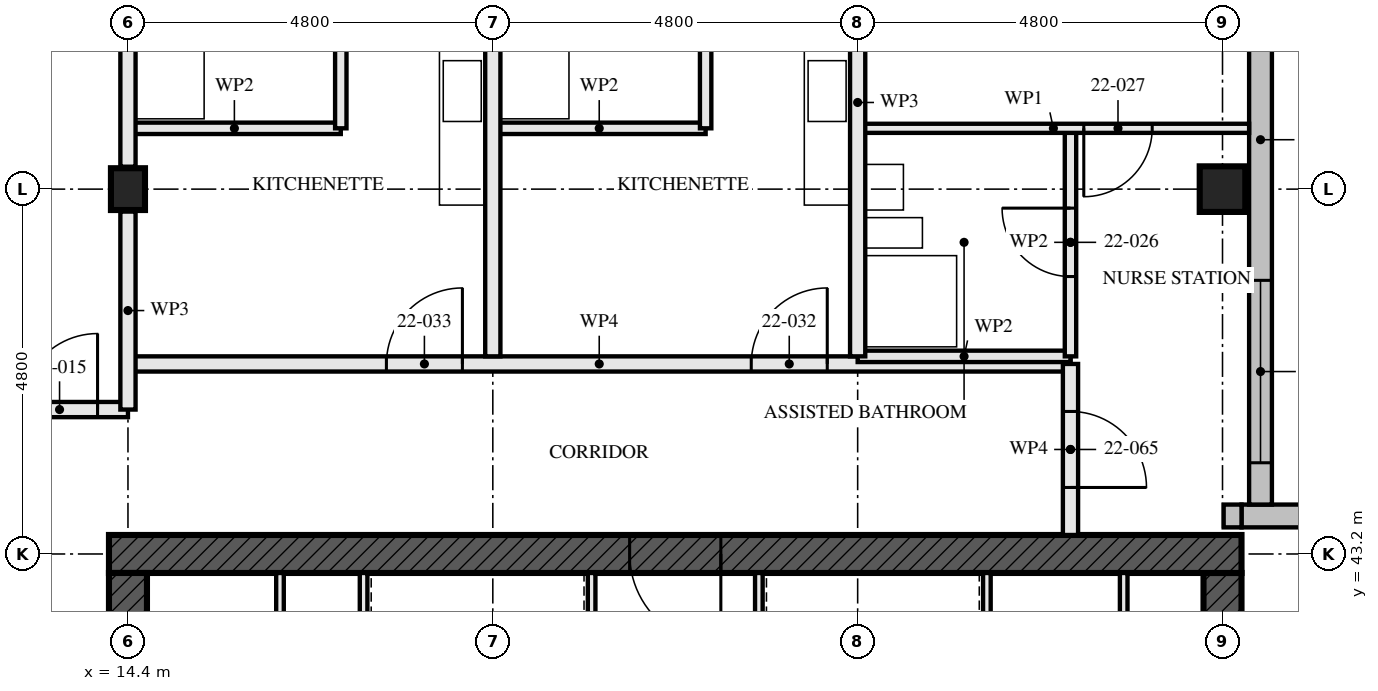
"""IFC4 building model, lengths in metres.
Left out: names, types, materials, properties, quantities, classifications, styles, units other than length and angle.
Written with IfcOpenShell. Run it as: python <this file> out.ifc"""

import sys

from ifc_helpers import new_model, si_unit, direction, frame, frame_2d, origin, origin_2d, place, context, subcontext, project, spatial, rectangle, hollow_rectangle, i_section, extrude, element, fill, save


model = new_model("IFC4")
c1 = context("Model", 3, precision=1e-05, world=origin(), true_north=direction((0.0, 1.0)))
c2 = subcontext(c1, "Body", "Model", "MODEL_VIEW")
j1 = project(units=[si_unit("LENGTHUNIT", "METRE"), si_unit("PLANEANGLEUNIT", "RADIAN")], contexts=[c1])
p1 = place(None, origin())
s1 = spatial("IfcSite", under=j1, at=p1, CompositionType="ELEMENT")
p2 = place(p1, origin())
s2 = spatial("IfcBuilding", under=s1, at=p2, CompositionType="ELEMENT")
p3 = place(p2, frame((0.0, 0.0, 84.0)))
s3 = spatial("IfcBuildingStorey", under=s2, at=p3, CompositionType="ELEMENT", Elevation=84.0)
p4 = place(p3, frame((14.4, 48.0, 0.0), z_axis=(0.0, 0.0, 1.0), x_axis=(1.0, 0.0, 0.0)))
e1 = element("IfcColumn", 1, at=p4, inside=s3, PredefinedType="COLUMN", context=c2, shape_type="SweptSolid", body=[
    extrude(i_section(OverallWidth=0.448, OverallDepth=0.55, WebThickness=0.072, FlangeThickness=0.115, FilletRadius=0.015, at=origin_2d()), origin(), (0.0, 0.0, 1.0), 3.5),
])
p5 = place(p3, frame((28.8, 48.0, 0.0), z_axis=(0.0, 0.0, 1.0), x_axis=(1.0, 0.0, 0.0)))
e2 = element("IfcColumn", 2, at=p5, inside=s3, PredefinedType="COLUMN", context=c2, shape_type="SweptSolid", body=[
    extrude(hollow_rectangle(XDim=0.6, YDim=0.6, WallThickness=0.08, at=origin_2d()), origin(), (0.0, 0.0, 1.0), 3.5),
])
p6 = place(p3, frame((29.05, 43.2, -0.17), z_axis=(0.0, 0.0, 1.0), x_axis=(-1.0, 0.0, 0.0)))
e3 = element("IfcWall", 3, at=p6, inside=s3, PredefinedType="SHEAR", context=c2, shape_type="SweptSolid", body=[
    extrude(rectangle(XDim=14.9, YDim=0.5, at=frame_2d((7.45, 0.0))), origin(), (0.0, 0.0, 1.0), 3.5),
])
p7 = place(p6, frame((6.85, 0.0, 0.17)))
e4 = element("IfcOpeningElement", 4, at=p7, cuts=e3, PredefinedType="OPENING", context=c2, shape_type="SweptSolid", body=[
    extrude(rectangle(XDim=1.2, YDim=2.1, at=frame_2d((0.6, 1.05))), frame((0.0, 0.26, 0.0), z_axis=(0.0, -1.0, 0.0), x_axis=(1.0, 0.0, 0.0)), (0.0, 0.0, 1.0), 0.521),
])
p8 = place(p3, frame((14.4, 42.95, -0.17), z_axis=(0.0, 0.0, 1.0), x_axis=(0.0, -1.0, 0.0)))
e5 = element("IfcWall", 5, at=p8, inside=s3, PredefinedType="SHEAR", context=c2, shape_type="SweptSolid", body=[
    extrude(rectangle(XDim=13.9, YDim=0.5, at=frame_2d((6.95, 0.0))), origin(), (0.0, 0.0, 1.0), 3.5),
])
p9 = place(p8, frame((6.35, 0.0, 0.17)))
e6 = element("IfcOpeningElement", 6, at=p9, cuts=e5, PredefinedType="OPENING", context=c2, shape_type="SweptSolid", body=[
    extrude(rectangle(XDim=1.2, YDim=2.1, at=frame_2d((0.6, 1.05))), frame((0.0, 0.26, 0.0), z_axis=(0.0, -1.0, 0.0), x_axis=(1.0, 0.0, 0.0)), (0.0, 0.0, 1.0), 0.521),
])
p10 = place(p3, frame((28.8, 29.05, -0.17), z_axis=(0.0, 0.0, 1.0), x_axis=(0.0, 1.0, 0.0)))
e7 = element("IfcWall", 7, at=p10, inside=s3, PredefinedType="SHEAR", context=c2, shape_type="SweptSolid", body=[
    extrude(rectangle(XDim=13.9, YDim=0.5, at=frame_2d((6.95, 0.0))), origin(), (0.0, 0.0, 1.0), 3.5),
])
p11 = place(p10, frame((6.35, 0.0, 0.17)))
e8 = element("IfcOpeningElement", 8, at=p11, cuts=e7, PredefinedType="OPENING", context=c2, shape_type="SweptSolid", body=[
    extrude(rectangle(XDim=1.2, YDim=2.1, at=frame_2d((0.6, 1.05))), frame((0.0, 0.26, 0.0), z_axis=(0.0, -1.0, 0.0), x_axis=(1.0, 0.0, 0.0)), (0.0, 0.0, 1.0), 0.521),
])
p12 = place(p3, frame((38.75, 43.7, 0.0), z_axis=(0.0, 0.0, 1.0), x_axis=(-1.0, 0.0, 0.0)))
e9 = element("IfcWall", 9, at=p12, inside=s3, PredefinedType="SOLIDWALL", context=c2, shape_type="SweptSolid", body=[
    extrude(rectangle(XDim=9.7, YDim=0.3, at=frame_2d((4.85, 0.0))), origin(), (0.0, 0.0, 1.0), 3.5),
])
p13 = place(p12, frame((2.25, 0.0, 0.0)))
e10 = element("IfcOpeningElement", 10, at=p13, cuts=e9, PredefinedType="OPENING", context=c2, shape_type="SweptSolid", body=[
    extrude(rectangle(XDim=1.0, YDim=2.4, at=frame_2d((0.5, 1.2))), frame((0.0, 0.161, 0.0), z_axis=(0.0, -1.0, 0.0), x_axis=(1.0, 0.0, 0.0)), (0.0, 0.0, 1.0), 0.321),
])
p14 = place(p12, frame((6.35, 0.0, 0.6)))
e11 = element("IfcOpeningElement", 11, at=p14, cuts=e9, PredefinedType="OPENING", context=c2, shape_type="SweptSolid", body=[
    extrude(rectangle(XDim=2.4, YDim=1.8, at=frame_2d((1.2, 0.9))), frame((0.0, 0.161, 0.0), z_axis=(0.0, -1.0, 0.0), x_axis=(1.0, 0.0, 0.0)), (0.0, 0.0, 1.0), 0.321),
])
p15 = place(p3, frame((29.3, 43.85, 0.0), z_axis=(0.0, 0.0, 1.0), x_axis=(0.0, 1.0, 0.0)))
e12 = element("IfcWall", 12, at=p15, inside=s3, PredefinedType="SOLIDWALL", context=c2, shape_type="SweptSolid", body=[
    extrude(rectangle(XDim=9.6, YDim=0.3, at=frame_2d((4.8, 0.0))), origin(), (0.0, 0.0, 1.0), 3.5),
])
p16 = place(p15, frame((6.05, 0.0, 0.0)))
e13 = element("IfcOpeningElement", 13, at=p16, cuts=e12, PredefinedType="OPENING", context=c2, shape_type="SweptSolid", body=[
    extrude(rectangle(XDim=1.0, YDim=2.4, at=frame_2d((0.5, 1.2))), frame((0.0, 0.161, 0.0), z_axis=(0.0, -1.0, 0.0), x_axis=(1.0, 0.0, 0.0)), (0.0, 0.0, 1.0), 0.321),
])
p17 = place(p15, frame((0.55, 0.0, 0.6)))
e14 = element("IfcOpeningElement", 14, at=p17, cuts=e12, PredefinedType="OPENING", context=c2, shape_type="SweptSolid", body=[
    extrude(rectangle(XDim=2.4, YDim=1.8, at=frame_2d((1.2, 0.9))), frame((0.0, 0.161, 0.0), z_axis=(0.0, -1.0, 0.0), x_axis=(1.0, 0.0, 0.0)), (0.0, 0.0, 1.0), 0.321),
])
p18 = place(p3, frame((29.05, 43.7, 2.39), z_axis=(0.0, 0.0, 1.0), x_axis=(-1.0, 0.0, 0.0)))
e15 = element("IfcWall", 15, at=p18, inside=s3, PredefinedType="SOLIDWALL", context=c2, shape_type="SweptSolid", body=[
    extrude(rectangle(XDim=0.235, YDim=0.3, at=frame_2d((0.118, 0.0))), origin(), (0.0, 0.0, 1.0), 0.88),
])
p19 = place(p3, frame((14.4, 45.1, 0.0), z_axis=(0.0, 0.0, 1.0), x_axis=(-1.0, 0.0, 0.0)))
e16 = element("IfcWall", 16, at=p19, inside=s3, PredefinedType="PARTITIONING", context=c2, shape_type="SweptSolid", body=[
    extrude(rectangle(XDim=9.6, YDim=0.2, at=frame_2d((4.8, 0.0))), origin(), (0.0, 0.0, 1.0), 3.33),
])
p20 = place(p19, frame((0.4, 0.0, 0.0)))
e17 = element("IfcOpeningElement", 17, at=p20, cuts=e16, PredefinedType="OPENING", context=c2, shape_type="SweptSolid", body=[
    extrude(rectangle(XDim=1.0, YDim=2.1, at=frame_2d((0.5, 1.05))), frame((0.0, 0.111, 0.0), z_axis=(0.0, -1.0, 0.0), x_axis=(1.0, 0.0, 0.0)), (0.0, 0.0, 1.0), 0.221),
])
p21 = place(p19, frame((5.2, 0.0, 0.0)))
e18 = element("IfcOpeningElement", 18, at=p21, cuts=e16, PredefinedType="OPENING", context=c2, shape_type="SweptSolid", body=[
    extrude(rectangle(XDim=1.0, YDim=2.1, at=frame_2d((0.5, 1.05))), frame((0.0, 0.111, 0.0), z_axis=(0.0, -1.0, 0.0), x_axis=(1.0, 0.0, 0.0)), (0.0, 0.0, 1.0), 0.221),
])
p22 = place(p3, frame((26.8, 48.8, 0.0), z_axis=(0.0, 0.0, 1.0), x_axis=(0.0, -1.0, 0.0)))
e19 = element("IfcWall", 19, at=p22, inside=s3, PredefinedType="PARTITIONING", context=c2, shape_type="SweptSolid", body=[
    extrude(rectangle(XDim=3.0, YDim=0.15, at=frame_2d((1.5, 0.0))), origin(), (0.0, 0.0, 1.0), 2.55),
])
p23 = place(p22, frame((1.05, 0.0, 0.0)))
e20 = element("IfcOpeningElement", 20, at=p23, cuts=e19, PredefinedType="OPENING", context=c2, shape_type="SweptSolid", body=[
    extrude(rectangle(XDim=0.9, YDim=2.1, at=frame_2d((0.45, 1.05))), frame((0.0, 0.085, 0.0), z_axis=(0.0, -1.0, 0.0), x_axis=(1.0, 0.0, 0.0)), (0.0, 0.0, 1.0), 0.171),
])
p24 = place(p3, frame((26.8, 45.8, 0.0), z_axis=(0.0, 0.0, 1.0), x_axis=(-1.0, 0.0, 0.0)))
e21 = element("IfcWall", 21, at=p24, inside=s3, PredefinedType="PARTITIONING", context=c2, shape_type="SweptSolid", body=[
    extrude(rectangle(XDim=2.8, YDim=0.15, at=frame_2d((1.4, 0.0))), origin(), (0.0, 0.0, 1.0), 3.33),
])
p25 = place(p3, frame((29.15, 48.8, 0.0), z_axis=(0.0, 0.0, 1.0), x_axis=(-1.0, 0.0, 0.0)))
e22 = element("IfcWall", 22, at=p25, inside=s3, PredefinedType="PARTITIONING", context=c2, shape_type="SweptSolid", body=[
    extrude(rectangle(XDim=5.15, YDim=0.12, at=frame_2d((2.575, 0.0))), origin(), (0.0, 0.0, 1.0), 2.32),
])
p26 = place(p25, frame((1.275, 0.0, 0.0)))
e23 = element("IfcOpeningElement", 23, at=p26, cuts=e22, PredefinedType="OPENING", context=c2, shape_type="SweptSolid", body=[
    extrude(rectangle(XDim=0.9, YDim=2.1, at=frame_2d((0.45, 1.05))), frame((0.0, 0.071, 0.0), z_axis=(0.0, -1.0, 0.0), x_axis=(1.0, 0.0, 0.0)), (0.0, 0.0, 1.0), 0.141),
])
p27 = place(p3, frame((24.0, 52.48, 0.0), z_axis=(0.0, 0.0, 1.0), x_axis=(0.0, -1.0, 0.0)))
e24 = element("IfcWall", 24, at=p27, inside=s3, PredefinedType="PARTITIONING", context=c2, shape_type="SweptSolid", body=[
    extrude(rectangle(XDim=6.68, YDim=0.2, at=frame_2d((3.34, 0.0))), origin(), (0.0, 0.0, 1.0), 2.55),
])
p28 = place(p3, frame((22.0, 51.8, 0.0), z_axis=(0.0, 0.0, 1.0), x_axis=(0.0, -1.0, 0.0)))
e25 = element("IfcWall", 25, at=p28, inside=s3, PredefinedType="PARTITIONING", context=c2, shape_type="SweptSolid", body=[
    extrude(rectangle(XDim=3.0, YDim=0.15, at=frame_2d((1.5, 0.0))), origin(), (0.0, 0.0, 1.0), 3.33),
])
p29 = place(p3, frame((22.0, 48.8, 0.0), z_axis=(0.0, 0.0, 1.0), x_axis=(-1.0, 0.0, 0.0)))
e26 = element("IfcWall", 26, at=p29, inside=s3, PredefinedType="PARTITIONING", context=c2, shape_type="SweptSolid", body=[
    extrude(rectangle(XDim=2.8, YDim=0.15, at=frame_2d((1.4, 0.0))), origin(), (0.0, 0.0, 1.0), 3.33),
])
p30 = place(p3, frame((19.2, 57.28, 0.0), z_axis=(0.0, 0.0, 1.0), x_axis=(0.0, -1.0, 0.0)))
e27 = element("IfcWall", 27, at=p30, inside=s3, PredefinedType="PARTITIONING", context=c2, shape_type="SweptSolid", body=[
    extrude(rectangle(XDim=11.48, YDim=0.2, at=frame_2d((5.74, 0.0))), origin(), (0.0, 0.0, 1.0), 2.55),
])
p31 = place(p3, frame((17.2, 51.8, 0.0), z_axis=(0.0, 0.0, 1.0), x_axis=(0.0, -1.0, 0.0)))
e28 = element("IfcWall", 28, at=p31, inside=s3, PredefinedType="PARTITIONING", context=c2, shape_type="SweptSolid", body=[
    extrude(rectangle(XDim=3.0, YDim=0.15, at=frame_2d((1.5, 0.0))), origin(), (0.0, 0.0, 1.0), 3.33),
])
p32 = place(p3, frame((17.2, 48.8, 0.0), z_axis=(0.0, 0.0, 1.0), x_axis=(-1.0, 0.0, 0.0)))
e29 = element("IfcWall", 29, at=p32, inside=s3, PredefinedType="PARTITIONING", context=c2, shape_type="SweptSolid", body=[
    extrude(rectangle(XDim=2.8, YDim=0.15, at=frame_2d((1.4, 0.0))), origin(), (0.0, 0.0, 1.0), 3.33),
])
p33 = place(p3, frame((26.8, 45.7, 0.0), z_axis=(0.0, 0.0, 1.0), x_axis=(-1.0, 0.0, 0.0)))
e30 = element("IfcWall", 30, at=p33, inside=s3, PredefinedType="PARTITIONING", context=c2, shape_type="SweptSolid", body=[
    extrude(rectangle(XDim=12.4, YDim=0.2, at=frame_2d((6.2, 0.0))), origin(), (0.0, 0.0, 1.0), 3.33),
])
p34 = place(p33, frame((3.2, 0.0, 0.0)))
e31 = element("IfcOpeningElement", 31, at=p34, cuts=e30, PredefinedType="OPENING", context=c2, shape_type="SweptSolid", body=[
    extrude(rectangle(XDim=1.0, YDim=2.1, at=frame_2d((0.5, 1.05))), frame((0.0, 0.111, 0.0), z_axis=(0.0, -1.0, 0.0), x_axis=(1.0, 0.0, 0.0)), (0.0, 0.0, 1.0), 0.221),
])
p35 = place(p33, frame((8.0, 0.0, 0.0)))
e32 = element("IfcOpeningElement", 32, at=p35, cuts=e30, PredefinedType="OPENING", context=c2, shape_type="SweptSolid", body=[
    extrude(rectangle(XDim=1.0, YDim=2.1, at=frame_2d((0.5, 1.05))), frame((0.0, 0.111, 0.0), z_axis=(0.0, -1.0, 0.0), x_axis=(1.0, 0.0, 0.0)), (0.0, 0.0, 1.0), 0.221),
])
for number, where, z_axis, x_axis in (
    (33, (16.4, 37.15, 0.0), (0.0, 0.0, 1.0), (0.0, 1.0, 0.0)),
    (34, (27.5, 37.15, 0.0), (0.0, 0.0, 1.0), (0.0, 1.0, 0.0)),
):
    element("IfcWall", number, at=place(p3, frame(where, z_axis=z_axis, x_axis=x_axis)), inside=s3, PredefinedType="SOLIDWALL", context=c2, shape_type="SweptSolid", body=[
        extrude(rectangle(XDim=5.8, YDim=0.1, at=frame_2d((2.9, 0.0))), origin(), (0.0, 0.0, 1.0), 3.33),
    ])
p36 = place(p3, frame((20.5, 37.15, 0.0), z_axis=(0.0, 0.0, 1.0), x_axis=(0.0, 1.0, 0.0)))
e35 = element("IfcWall", 35, at=p36, inside=s3, PredefinedType="SOLIDWALL", context=c2, shape_type="SweptSolid", body=[
    extrude(rectangle(XDim=5.8, YDim=0.1, at=frame_2d((2.9, 0.0))), origin(), (0.0, 0.0, 1.0), 3.33),
])
p37 = place(p36, frame((0.925, 0.0, 0.0)))
e36 = element("IfcOpeningElement", 36, at=p37, cuts=e35, PredefinedType="OPENING", context=c2, shape_type="SweptSolid", body=[
    extrude(rectangle(XDim=1.0, YDim=2.1, at=frame_2d((0.5, 1.05))), frame((0.0, 0.061, 0.0), z_axis=(0.0, -1.0, 0.0), x_axis=(1.0, 0.0, 0.0)), (0.0, 0.0, 1.0), 0.121),
])
p38 = place(p36, frame((3.9, 0.0, 0.0)))
e37 = element("IfcOpeningElement", 37, at=p38, cuts=e35, PredefinedType="OPENING", context=c2, shape_type="SweptSolid", body=[
    extrude(rectangle(XDim=1.0, YDim=2.1, at=frame_2d((0.5, 1.05))), frame((0.0, 0.061, 0.0), z_axis=(0.0, -1.0, 0.0), x_axis=(1.0, 0.0, 0.0)), (0.0, 0.0, 1.0), 0.121),
])
p39 = place(p3, frame((22.7, 37.15, 0.0), z_axis=(0.0, 0.0, 1.0), x_axis=(0.0, 1.0, 0.0)))
e38 = element("IfcWall", 38, at=p39, inside=s3, PredefinedType="SOLIDWALL", context=c2, shape_type="SweptSolid", body=[
    extrude(rectangle(XDim=5.8, YDim=0.1, at=frame_2d((2.9, 0.0))), origin(), (0.0, 0.0, 1.0), 3.33),
])
p40 = place(p39, frame((0.925, 0.0, 0.0)))
e39 = element("IfcOpeningElement", 39, at=p40, cuts=e38, PredefinedType="OPENING", context=c2, shape_type="SweptSolid", body=[
    extrude(rectangle(XDim=1.0, YDim=2.1, at=frame_2d((0.5, 1.05))), frame((0.0, 0.061, 0.0), z_axis=(0.0, -1.0, 0.0), x_axis=(1.0, 0.0, 0.0)), (0.0, 0.0, 1.0), 0.121),
])
p41 = place(p39, frame((3.9, 0.0, 0.0)))
e40 = element("IfcOpeningElement", 40, at=p41, cuts=e38, PredefinedType="OPENING", context=c2, shape_type="SweptSolid", body=[
    extrude(rectangle(XDim=1.0, YDim=2.1, at=frame_2d((0.5, 1.05))), frame((0.0, 0.061, 0.0), z_axis=(0.0, -1.0, 0.0), x_axis=(1.0, 0.0, 0.0)), (0.0, 0.0, 1.0), 0.121),
])
for number, where, z_axis, x_axis in (
    (41, (17.5, 37.15, 0.0), (0.0, 0.0, 1.0), (0.0, 1.0, 0.0)),
    (42, (25.7, 37.15, 0.0), (0.0, 0.0, 1.0), (0.0, 1.0, 0.0)),
):
    element("IfcWall", number, at=place(p3, frame(where, z_axis=z_axis, x_axis=x_axis)), inside=s3, PredefinedType="SOLIDWALL", context=c2, shape_type="SweptSolid", body=[
        extrude(rectangle(XDim=5.8, YDim=0.1, at=frame_2d((2.9, 0.0))), origin(), (0.0, 0.0, 1.0), 3.33),
    ])
p42 = place(p3, frame((14.4, 45.1, 0.0), z_axis=(0.0, 0.0, 1.0), x_axis=(0.0, 1.0, 0.0)))
e43 = element("IfcWall", 43, at=p42, inside=s3, PredefinedType="PARTITIONING", context=c2, shape_type="SweptSolid", body=[
    extrude(rectangle(XDim=2.605, YDim=0.2, at=frame_2d((1.302, 0.0))), origin(), (0.0, 0.0, 1.0), 2.32),
])
p43 = place(p3, frame((14.4, 48.295, 0.0), z_axis=(0.0, 0.0, 1.0), x_axis=(0.0, 1.0, 0.0)))
e44 = element("IfcWall", 44, at=p43, inside=s3, PredefinedType="PARTITIONING", context=c2, shape_type="SweptSolid", body=[
    extrude(rectangle(XDim=4.21, YDim=0.2, at=frame_2d((2.105, 0.0))), origin(), (0.0, 0.0, 1.0), 2.32),
])
p44 = place(p3, frame((26.8, 45.7, 0.0), z_axis=(0.0, 0.0, 1.0), x_axis=(0.0, -1.0, 0.0)))
e45 = element("IfcWall", 45, at=p44, inside=s3, PredefinedType="PARTITIONING", context=c2, shape_type="SweptSolid", body=[
    extrude(rectangle(XDim=2.25, YDim=0.2, at=frame_2d((1.125, 0.0))), origin(), (0.0, 0.0, 1.0), 3.33),
])
p45 = place(p44, frame((0.625, 0.0, 0.0)))
e46 = element("IfcOpeningElement", 46, at=p45, cuts=e45, PredefinedType="OPENING", context=c2, shape_type="SweptSolid", body=[
    extrude(rectangle(XDim=1.0, YDim=2.1, at=frame_2d((0.5, 1.05))), frame((0.0, 0.111, 0.0), z_axis=(0.0, -1.0, 0.0), x_axis=(1.0, 0.0, 0.0)), (0.0, 0.0, 1.0), 0.221),
])
p46 = place(p17, origin())
e47 = element("IfcWindow", 47, at=p46, inside=s3, PartitioningType="SINGLE_PANEL", PredefinedType="WINDOW", context=c2, shape_type="SweptSolid", body=[
    extrude(rectangle(XDim=2.4, YDim=1.8, at=frame_2d((1.2, 0.9))), frame((0.0, 0.03, 0.0), z_axis=(0.0, -1.0, 0.0), x_axis=(1.0, 0.0, 0.0)), (0.0, 0.0, 1.0), 0.06),
])
fill(e14, e47)
p47 = place(p20, frame((1.0, 0.0, 0.0), z_axis=(0.0, 0.0, 1.0), x_axis=(-1.0, 0.0, 0.0)))
e48 = element("IfcDoor", 48, at=p47, inside=s3, OperationType="SINGLE_SWING_LEFT", PredefinedType="DOOR", context=c2, shape_type="SweptSolid", body=[
    extrude(rectangle(XDim=1.0, YDim=2.1, at=frame_2d((0.5, 1.05))), frame((0.0, 0.027, 0.0), z_axis=(0.0, -1.0, 0.0), x_axis=(1.0, 0.0, 0.0)), (0.0, 0.0, 1.0), 0.054),
])
fill(e17, e48)
p48 = place(p23, frame((0.9, 0.0, 0.0), z_axis=(0.0, 0.0, 1.0), x_axis=(-1.0, 0.0, 0.0)))
e49 = element("IfcDoor", 49, at=p48, inside=s3, OperationType="SINGLE_SWING_LEFT", PredefinedType="DOOR", context=c2, shape_type="SweptSolid", body=[
    extrude(rectangle(XDim=0.9, YDim=2.1, at=frame_2d((0.45, 1.05))), frame((0.0, 0.022, 0.0), z_axis=(0.0, -1.0, 0.0), x_axis=(1.0, 0.0, 0.0)), (0.0, 0.0, 1.0), 0.044),
])
fill(e20, e49)
p49 = place(p26, origin())
e50 = element("IfcDoor", 50, at=p49, inside=s3, OperationType="SINGLE_SWING_LEFT", PredefinedType="DOOR", context=c2, shape_type="SweptSolid", body=[
    extrude(rectangle(XDim=0.9, YDim=2.1, at=frame_2d((0.45, 1.05))), frame((0.0, 0.022, 0.0), z_axis=(0.0, -1.0, 0.0), x_axis=(1.0, 0.0, 0.0)), (0.0, 0.0, 1.0), 0.044),
])
fill(e23, e50)
p50 = place(p34, frame((1.0, 0.0, 0.0), z_axis=(0.0, 0.0, 1.0), x_axis=(-1.0, 0.0, 0.0)))
e51 = element("IfcDoor", 51, at=p50, inside=s3, OperationType="SINGLE_SWING_LEFT", PredefinedType="DOOR", context=c2, shape_type="SweptSolid", body=[
    extrude(rectangle(XDim=1.0, YDim=2.1, at=frame_2d((0.5, 1.05))), frame((0.0, 0.027, 0.0), z_axis=(0.0, -1.0, 0.0), x_axis=(1.0, 0.0, 0.0)), (0.0, 0.0, 1.0), 0.054),
])
fill(e31, e51)
p51 = place(p35, frame((1.0, 0.0, 0.0), z_axis=(0.0, 0.0, 1.0), x_axis=(-1.0, 0.0, 0.0)))
e52 = element("IfcDoor", 52, at=p51, inside=s3, OperationType="SINGLE_SWING_LEFT", PredefinedType="DOOR", context=c2, shape_type="SweptSolid", body=[
    extrude(rectangle(XDim=1.0, YDim=2.1, at=frame_2d((0.5, 1.05))), frame((0.0, 0.027, 0.0), z_axis=(0.0, -1.0, 0.0), x_axis=(1.0, 0.0, 0.0)), (0.0, 0.0, 1.0), 0.054),
])
fill(e32, e52)
p52 = place(p45, origin())
e53 = element("IfcDoor", 53, at=p52, inside=s3, OperationType="SINGLE_SWING_LEFT", PredefinedType="DOOR", context=c2, shape_type="SweptSolid", body=[
    extrude(rectangle(XDim=1.0, YDim=2.1, at=frame_2d((0.5, 1.05))), frame((0.0, 0.027, 0.0), z_axis=(0.0, -1.0, 0.0), x_axis=(1.0, 0.0, 0.0)), (0.0, 0.0, 1.0), 0.054),
])
fill(e46, e53)
p53 = place(p7, origin())
e54 = element("IfcDoor", 54, at=p53, inside=s3, OperationType="SINGLE_SWING_LEFT", PredefinedType="DOOR", context=c2, shape_type="SweptSolid", body=[
    extrude(rectangle(XDim=1.2, YDim=2.1, at=frame_2d((0.6, 1.05))), frame((0.0, 0.027, 0.0), z_axis=(0.0, -1.0, 0.0), x_axis=(1.0, 0.0, 0.0)), (0.0, 0.0, 1.0), 0.054),
])
fill(e4, e54)
save(model, sys.argv[1])
